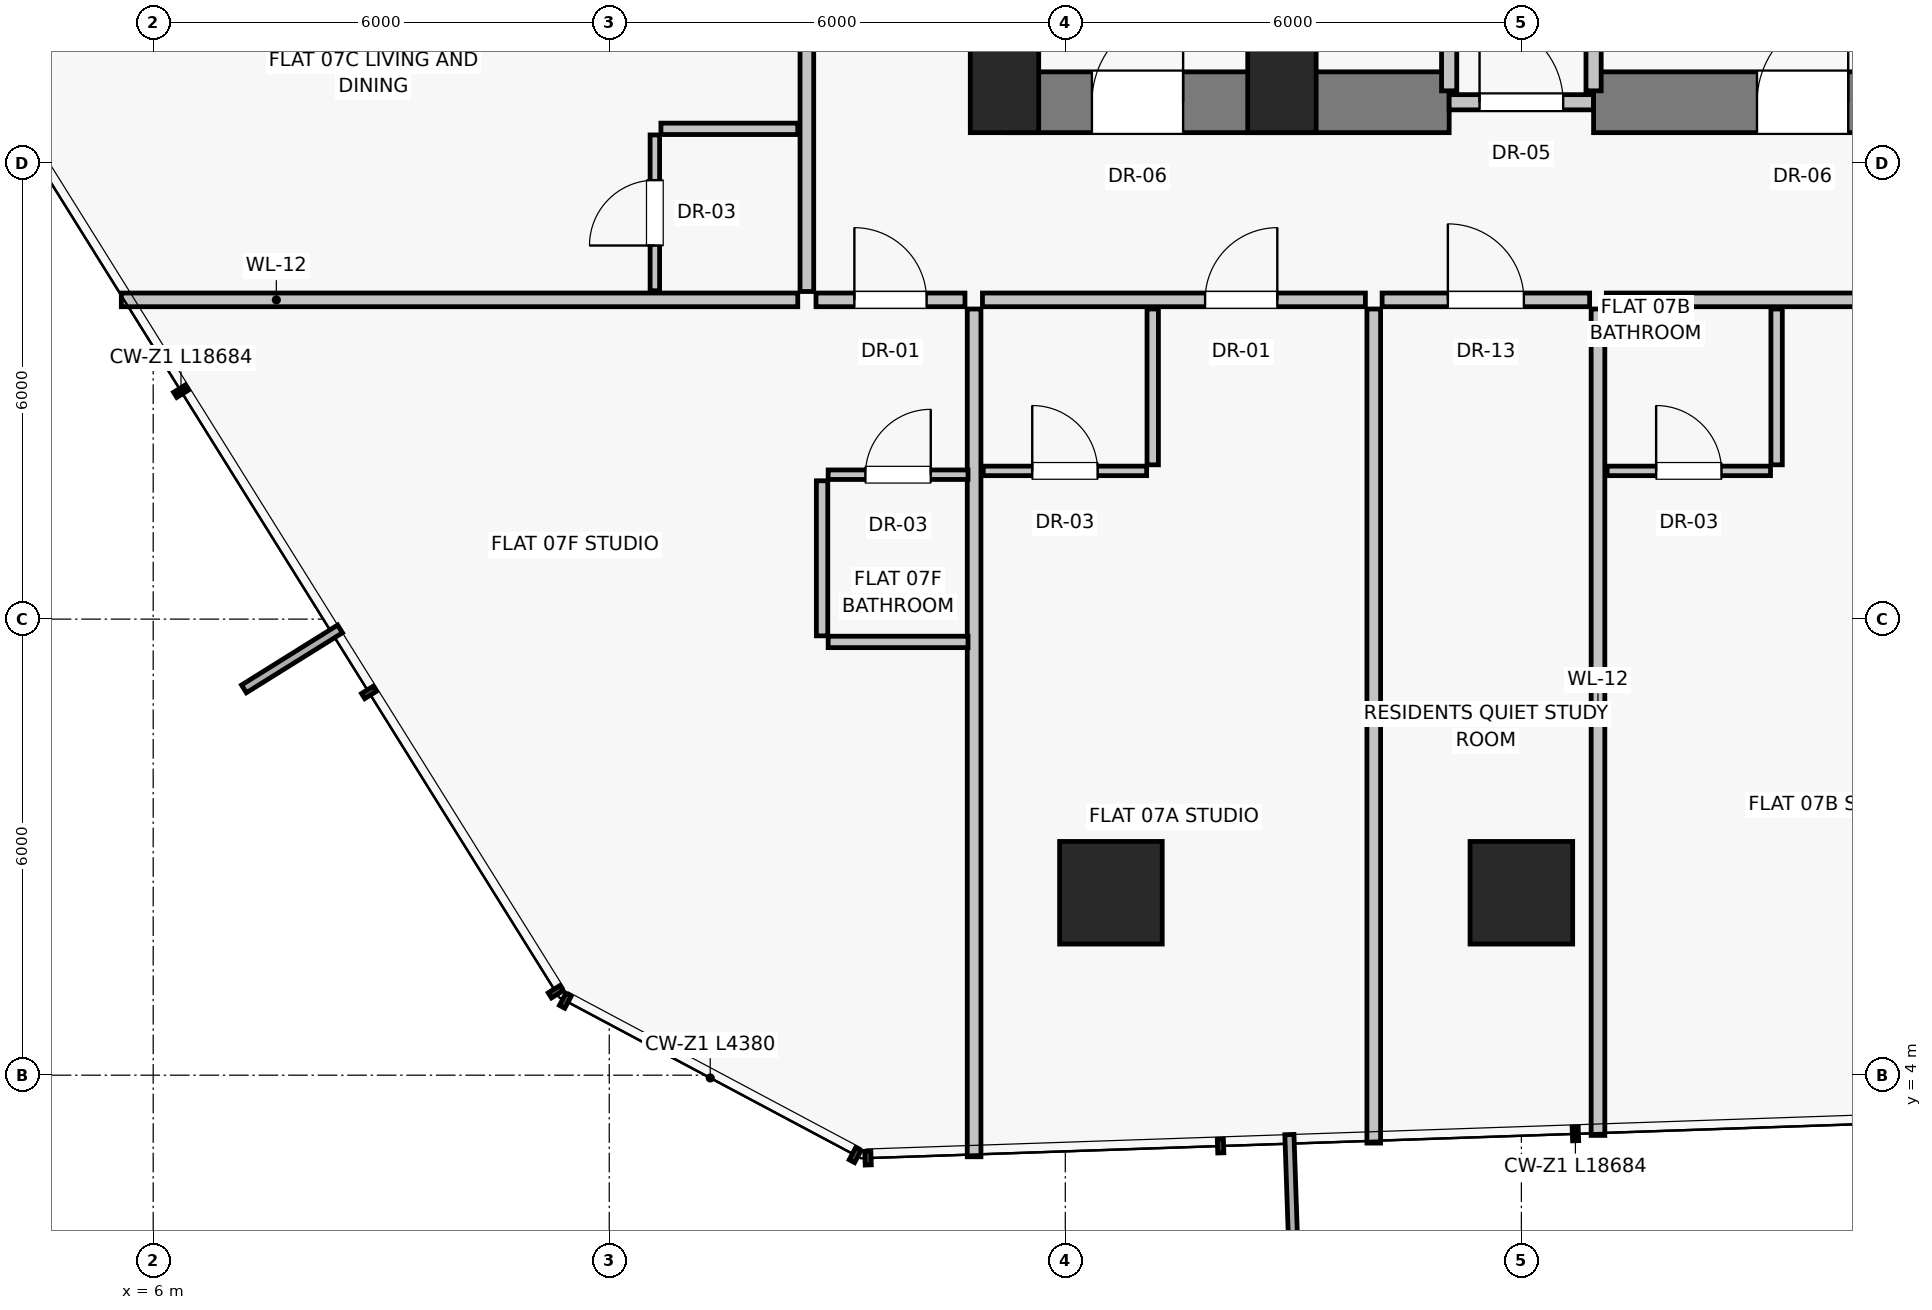
"""IFC4 building model, lengths in metres.
Left out: names, types, materials, properties, quantities, classifications, styles, units other than length and angle.
Written with IfcOpenShell. Run it as: python <this file> out.ifc"""

import sys

from ifc_helpers import new_model, si_unit, direction, frame, frame_2d, origin, origin_2d, place, context, subcontext, project, spatial, rectangle, extrude, source, transform, mapped, element, fill, save


model = new_model("IFC4")
c1 = context("Model", 3, precision=1e-05, world=origin(), true_north=direction((0.0, 1.0)))
c2 = subcontext(c1, "Body", "Model", "MODEL_VIEW")
j1 = project(units=[si_unit("LENGTHUNIT", "METRE"), si_unit("PLANEANGLEUNIT", "RADIAN")], contexts=[c1])
p1 = place(None, origin())
s1 = spatial("IfcSite", under=j1, at=p1, CompositionType="ELEMENT")
p2 = place(p1, origin())
s2 = spatial("IfcBuilding", under=s1, at=p2, CompositionType="ELEMENT")
p3 = place(p2, frame((0.0, 0.0, 30.55)))
s3 = spatial("IfcBuildingStorey", under=s2, at=p3, CompositionType="ELEMENT", Elevation=30.55)
for number, where, z_axis, x_axis in (
    (1, (17.2, 17.0, 0.0), (0.0, 0.0, 1.0), (1.0, 0.0, 0.0)),
    (2, (20.85, 17.0, 0.0), (0.0, 0.0, 1.0), (1.0, 0.0, 0.0)),
):
    element("IfcColumn", number, at=place(p3, frame(where, z_axis=z_axis, x_axis=x_axis)), inside=s3, PredefinedType="PILASTER", context=c2, shape_type="SweptSolid", body=[
        extrude(rectangle(XDim=0.9, YDim=1.2, at=origin_2d()), origin(), (0.0, 0.0, 1.0), 3.25),
    ])
for number, where, z_axis, x_axis in (
    (3, (18.6, 6.4, 0.0), (0.0, 0.0, 1.0), (1.0, 0.0, 0.0)),
    (4, (24.0, 6.4, 0.0), (0.0, 0.0, 1.0), (1.0, 0.0, 0.0)),
):
    element("IfcColumn", number, at=place(p3, frame(where, z_axis=z_axis, x_axis=x_axis)), inside=s3, PredefinedType="COLUMN", context=c2, shape_type="SweptSolid", body=[
        extrude(rectangle(XDim=1.35, YDim=1.35, at=origin_2d()), origin(), (0.0, 0.0, 1.0), 3.25),
    ])
p4 = place(p3, frame((17.2, 16.8, 0.0), z_axis=(0.0, 0.0, 1.0), x_axis=(0.0, 1.0, 0.0)))
e5 = element("IfcWall", 5, at=p4, inside=s3, PredefinedType="SHEAR", context=c2, shape_type="SweptSolid", body=[
    extrude(rectangle(XDim=14.2, YDim=0.8, at=frame_2d((7.1, 0.0))), origin(), (0.0, 0.0, 1.0), 3.0),
])
p5 = place(p3, frame((17.2, 16.8, 0.0), z_axis=(0.0, 0.0, 1.0), x_axis=(1.0, 0.0, 0.0)))
e6 = element("IfcWall", 6, at=p5, inside=s3, PredefinedType="SHEAR", context=c2, shape_type="SweptSolid", body=[
    extrude(rectangle(XDim=5.85, YDim=0.8, at=frame_2d((2.925, 0.0))), origin(), (0.0, 0.0, 1.0), 3.0),
])
p6 = place(p5, frame((1.15, 0.0, 0.0)))
e7 = element("IfcOpeningElement", 7, at=p6, cuts=e6, PredefinedType="OPENING", context=c2, shape_type="SweptSolid", body=[
    extrude(rectangle(XDim=1.2, YDim=2.03, at=frame_2d((0.6, 1.015))), frame((0.0, 0.41, 0.0), z_axis=(0.0, -1.0, 0.0), x_axis=(1.0, 0.0, 0.0)), (0.0, 0.0, 1.0), 0.82),
])
p7 = place(p3, frame((23.05, 16.8, 0.0), z_axis=(0.0, 0.0, 1.0), x_axis=(1.0, 0.0, 0.0)))
e8 = element("IfcWall", 8, at=p7, inside=s3, PredefinedType="SOLIDWALL", context=c2, shape_type="SweptSolid", body=[
    extrude(rectangle(XDim=1.9, YDim=0.2, at=frame_2d((0.95, 0.0))), origin(), (0.0, 0.0, 1.0), 2.15),
])
p8 = place(p7, frame((0.4, 0.0, 0.0)))
e9 = element("IfcOpeningElement", 9, at=p8, cuts=e8, PredefinedType="OPENING", context=c2, shape_type="SweptSolid", body=[
    extrude(rectangle(XDim=1.1, YDim=2.03, at=frame_2d((0.55, 1.015))), frame((0.0, 0.11, 0.0), z_axis=(0.0, -1.0, 0.0), x_axis=(1.0, 0.0, 0.0)), (0.0, 0.0, 1.0), 0.22),
])
p9 = place(p3, frame((24.95, 16.8, 0.0), z_axis=(0.0, 0.0, 1.0), x_axis=(1.0, 0.0, 0.0)))
e10 = element("IfcWall", 10, at=p9, inside=s3, PredefinedType="SHEAR", context=c2, shape_type="SweptSolid", body=[
    extrude(rectangle(XDim=5.85, YDim=0.8, at=frame_2d((2.925, 0.0))), origin(), (0.0, 0.0, 1.0), 3.0),
])
p10 = place(p9, frame((2.15, 0.0, 0.0)))
e11 = element("IfcOpeningElement", 11, at=p10, cuts=e10, PredefinedType="OPENING", context=c2, shape_type="SweptSolid", body=[
    extrude(rectangle(XDim=1.2, YDim=2.03, at=frame_2d((0.6, 1.015))), frame((0.0, 0.41, 0.0), z_axis=(0.0, -1.0, 0.0), x_axis=(1.0, 0.0, 0.0)), (0.0, 0.0, 1.0), 0.82),
])
for number, where, z_axis, x_axis in (
    (12, (23.05, 16.95, 0.0), (0.0, 0.0, 1.0), (0.0, 1.0, 0.0)),
    (13, (24.95, 16.95, 0.0), (0.0, 0.0, 1.0), (0.0, 1.0, 0.0)),
):
    element("IfcWall", number, at=place(p3, frame(where, z_axis=z_axis, x_axis=x_axis)), inside=s3, PredefinedType="SOLIDWALL", context=c2, shape_type="SweptSolid", body=[
        extrude(rectangle(XDim=5.6, YDim=0.2, at=frame_2d((2.8, 0.0))), origin(), (0.0, 0.0, 1.0), 3.0),
    ])
p11 = place(p3, frame((16.8, 14.08, 0.0), z_axis=(0.0, 0.0, 1.0), x_axis=(0.0, -1.0, 0.0)))
e14 = element("IfcWall", 14, at=p11, inside=s3, PredefinedType="PARTITIONING", context=c2, shape_type="SweptSolid", body=[
    extrude(rectangle(XDim=11.153, YDim=0.18, at=frame_2d((5.577, 0.0))), origin(), (0.0, 0.0, 1.0), 3.0),
])
p12 = place(p3, frame((22.168, 14.2, 0.0), z_axis=(0.0, 0.0, 1.0), x_axis=(1.0, 0.0, 0.0)))
e15 = element("IfcWall", 15, at=p12, inside=s3, PredefinedType="PARTITIONING", context=c2, shape_type="SweptSolid", body=[
    extrude(rectangle(XDim=2.73, YDim=0.18, at=frame_2d((1.365, 0.0))), origin(), (0.0, 0.0, 1.0), 3.0),
])
p13 = place(p12, frame((0.865, 0.0, 0.0)))
e16 = element("IfcOpeningElement", 16, at=p13, cuts=e15, PredefinedType="OPENING", context=c2, shape_type="SweptSolid", body=[
    extrude(rectangle(XDim=1.0, YDim=2.01, at=frame_2d((0.5, 1.005))), frame((0.0, 0.1, 0.0), z_axis=(0.0, -1.0, 0.0), x_axis=(1.0, 0.0, 0.0)), (0.0, 0.0, 1.0), 0.2),
])
p14 = place(p3, frame((22.058, 14.08, 0.0), z_axis=(0.0, 0.0, 1.0), x_axis=(0.0, -1.0, 0.0)))
e17 = element("IfcWall", 17, at=p14, inside=s3, PredefinedType="PARTITIONING", context=c2, shape_type="SweptSolid", body=[
    extrude(rectangle(XDim=10.973, YDim=0.18, at=frame_2d((5.487, 0.0))), origin(), (0.0, 0.0, 1.0), 3.0),
])
p15 = place(p3, frame((16.91, 14.2, 0.0), z_axis=(0.0, 0.0, 1.0), x_axis=(1.0, 0.0, 0.0)))
e18 = element("IfcWall", 18, at=p15, inside=s3, PredefinedType="PARTITIONING", context=c2, shape_type="SweptSolid", body=[
    extrude(rectangle(XDim=5.038, YDim=0.18, at=frame_2d((2.519, 0.0))), origin(), (0.0, 0.0, 1.0), 3.0),
])
p16 = place(p15, frame((2.929, 0.0, 0.0)))
e19 = element("IfcOpeningElement", 19, at=p16, cuts=e18, PredefinedType="OPENING", context=c2, shape_type="SweptSolid", body=[
    extrude(rectangle(XDim=0.95, YDim=2.02, at=frame_2d((0.475, 1.01))), frame((0.0, 0.1, 0.0), z_axis=(0.0, -1.0, 0.0), x_axis=(1.0, 0.0, 0.0)), (0.0, 0.0, 1.0), 0.2),
])
p17 = place(p3, frame((19.15, 14.08, 0.0), z_axis=(0.0, 0.0, 1.0), x_axis=(0.0, -1.0, 0.0)))
e20 = element("IfcWall", 20, at=p17, inside=s3, PredefinedType="PARTITIONING", context=c2, shape_type="SweptSolid", body=[
    extrude(rectangle(XDim=2.05, YDim=0.15, at=frame_2d((1.025, 0.0))), origin(), (0.0, 0.0, 1.0), 3.0),
])
p18 = place(p3, frame((16.92, 11.95, 0.0), z_axis=(0.0, 0.0, 1.0), x_axis=(1.0, 0.0, 0.0)))
e21 = element("IfcWall", 21, at=p18, inside=s3, PredefinedType="PARTITIONING", context=c2, shape_type="SweptSolid", body=[
    extrude(rectangle(XDim=2.15, YDim=0.125, at=frame_2d((1.075, 0.0))), origin(), (0.0, 0.0, 1.0), 2.58),
])
p19 = place(p18, frame((0.645, 0.0, 0.0)))
e22 = element("IfcOpeningElement", 22, at=p19, cuts=e21, PredefinedType="OPENING", context=c2, shape_type="SweptSolid", body=[
    extrude(rectangle(XDim=0.86, YDim=2.01, at=frame_2d((0.43, 1.005))), frame((0.0, 0.073, 0.0), z_axis=(0.0, -1.0, 0.0), x_axis=(1.0, 0.0, 0.0)), (0.0, 0.0, 1.0), 0.145),
])
p20 = place(p3, frame((25.008, 14.08, 0.0), z_axis=(0.0, 0.0, 1.0), x_axis=(0.0, -1.0, 0.0)))
e23 = element("IfcWall", 23, at=p20, inside=s3, PredefinedType="PARTITIONING", context=c2, shape_type="SweptSolid", body=[
    extrude(rectangle(XDim=10.872, YDim=0.18, at=frame_2d((5.436, 0.0))), origin(), (0.0, 0.0, 1.0), 3.0),
])
p21 = place(p3, frame((25.118, 14.2, 0.0), z_axis=(0.0, 0.0, 1.0), x_axis=(1.0, 0.0, 0.0)))
e24 = element("IfcWall", 24, at=p21, inside=s3, PredefinedType="PARTITIONING", context=c2, shape_type="SweptSolid", body=[
    extrude(rectangle(XDim=5.972, YDim=0.18, at=frame_2d((2.986, 0.0))), origin(), (0.0, 0.0, 1.0), 3.0),
])
p22 = place(p21, frame((3.62, 0.0, 0.0)))
e25 = element("IfcOpeningElement", 25, at=p22, cuts=e24, PredefinedType="OPENING", context=c2, shape_type="SweptSolid", body=[
    extrude(rectangle(XDim=0.95, YDim=2.02, at=frame_2d((0.475, 1.01))), frame((0.0, 0.1, 0.0), z_axis=(0.0, -1.0, 0.0), x_axis=(1.0, 0.0, 0.0)), (0.0, 0.0, 1.0), 0.2),
])
p23 = place(p3, frame((27.358, 14.08, 0.0), z_axis=(0.0, 0.0, 1.0), x_axis=(0.0, -1.0, 0.0)))
e26 = element("IfcWall", 26, at=p23, inside=s3, PredefinedType="PARTITIONING", context=c2, shape_type="SweptSolid", body=[
    extrude(rectangle(XDim=2.05, YDim=0.15, at=frame_2d((1.025, 0.0))), origin(), (0.0, 0.0, 1.0), 3.0),
])
p24 = place(p3, frame((25.128, 11.95, 0.0), z_axis=(0.0, 0.0, 1.0), x_axis=(1.0, 0.0, 0.0)))
e27 = element("IfcWall", 27, at=p24, inside=s3, PredefinedType="PARTITIONING", context=c2, shape_type="SweptSolid", body=[
    extrude(rectangle(XDim=2.15, YDim=0.125, at=frame_2d((1.075, 0.0))), origin(), (0.0, 0.0, 1.0), 2.58),
])
p25 = place(p24, frame((0.645, 0.0, 0.0)))
e28 = element("IfcOpeningElement", 28, at=p25, cuts=e27, PredefinedType="OPENING", context=c2, shape_type="SweptSolid", body=[
    extrude(rectangle(XDim=0.86, YDim=2.01, at=frame_2d((0.43, 1.005))), frame((0.0, 0.073, 0.0), z_axis=(0.0, -1.0, 0.0), x_axis=(1.0, 0.0, 0.0)), (0.0, 0.0, 1.0), 0.145),
])
p26 = place(p3, frame((14.48, 14.2, 0.0), z_axis=(0.0, 0.0, 1.0), x_axis=(-1.0, 0.0, 0.0)))
e29 = element("IfcWall", 29, at=p26, inside=s3, PredefinedType="PARTITIONING", context=c2, shape_type="SweptSolid", body=[
    extrude(rectangle(XDim=8.899, YDim=0.18, at=frame_2d((4.45, 0.0))), origin(), (0.0, 0.0, 1.0), 3.0),
])
p27 = place(p3, frame((14.6, 14.31, 0.0), z_axis=(0.0, 0.0, 1.0), x_axis=(0.0, 1.0, 0.0)))
e30 = element("IfcWall", 30, at=p27, inside=s3, PredefinedType="PARTITIONING", context=c2, shape_type="SweptSolid", body=[
    extrude(rectangle(XDim=11.808, YDim=0.18, at=frame_2d((5.904, 0.0))), origin(), (0.0, 0.0, 1.0), 3.0),
])
p28 = place(p27, frame((3.847, 0.0, 0.0)))
e31 = element("IfcOpeningElement", 31, at=p28, cuts=e30, PredefinedType="OPENING", context=c2, shape_type="SweptSolid", body=[
    extrude(rectangle(XDim=0.95, YDim=2.02, at=frame_2d((0.475, 1.01))), frame((0.0, 0.1, 0.0), z_axis=(0.0, -1.0, 0.0), x_axis=(1.0, 0.0, 0.0)), (0.0, 0.0, 1.0), 0.2),
])
p29 = place(p3, frame((14.48, 16.45, 0.0), z_axis=(0.0, 0.0, 1.0), x_axis=(-1.0, 0.0, 0.0)))
e32 = element("IfcWall", 32, at=p29, inside=s3, PredefinedType="PARTITIONING", context=c2, shape_type="SweptSolid", body=[
    extrude(rectangle(XDim=1.8, YDim=0.15, at=frame_2d((0.9, 0.0))), origin(), (0.0, 0.0, 1.0), 3.0),
])
p30 = place(p3, frame((12.6, 14.32, 0.0), z_axis=(0.0, 0.0, 1.0), x_axis=(0.0, 1.0, 0.0)))
e33 = element("IfcWall", 33, at=p30, inside=s3, PredefinedType="PARTITIONING", context=c2, shape_type="SweptSolid", body=[
    extrude(rectangle(XDim=2.05, YDim=0.125, at=frame_2d((1.025, 0.0))), origin(), (0.0, 0.0, 1.0), 3.0),
])
p31 = place(p30, frame((0.595, 0.0, 0.0)))
e34 = element("IfcOpeningElement", 34, at=p31, cuts=e33, PredefinedType="OPENING", context=c2, shape_type="SweptSolid", body=[
    extrude(rectangle(XDim=0.86, YDim=2.01, at=frame_2d((0.43, 1.005))), frame((0.0, 0.073, 0.0), z_axis=(0.0, -1.0, 0.0), x_axis=(1.0, 0.0, 0.0)), (0.0, 0.0, 1.0), 0.145),
])
p32 = place(p3, frame((14.72, 14.2, 0.0), z_axis=(0.0, 0.0, 1.0), x_axis=(1.0, 0.0, 0.0)))
e35 = element("IfcWall", 35, at=p32, inside=s3, PredefinedType="PARTITIONING", context=c2, shape_type="SweptSolid", body=[
    extrude(rectangle(XDim=1.96, YDim=0.18, at=frame_2d((0.98, 0.0))), origin(), (0.0, 0.0, 1.0), 3.0),
])
p33 = place(p32, frame((0.505, 0.0, 0.0)))
e36 = element("IfcOpeningElement", 36, at=p33, cuts=e35, PredefinedType="OPENING", context=c2, shape_type="SweptSolid", body=[
    extrude(rectangle(XDim=0.95, YDim=2.02, at=frame_2d((0.475, 1.01))), frame((0.0, 0.1, 0.0), z_axis=(0.0, -1.0, 0.0), x_axis=(1.0, 0.0, 0.0)), (0.0, 0.0, 1.0), 0.2),
])
p34 = place(p3, frame((14.88, 11.9, 0.0), z_axis=(0.0, 0.0, 1.0), x_axis=(1.0, 0.0, 0.0)))
e37 = element("IfcWall", 37, at=p34, inside=s3, PredefinedType="PARTITIONING", context=c2, shape_type="SweptSolid", body=[
    extrude(rectangle(XDim=1.84, YDim=0.125, at=frame_2d((0.92, 0.0))), origin(), (0.0, 0.0, 1.0), 3.0),
])
p35 = place(p34, frame((0.49, 0.0, 0.0)))
e38 = element("IfcOpeningElement", 38, at=p35, cuts=e37, PredefinedType="OPENING", context=c2, shape_type="SweptSolid", body=[
    extrude(rectangle(XDim=0.86, YDim=2.01, at=frame_2d((0.43, 1.005))), frame((0.0, 0.073, 0.0), z_axis=(0.0, -1.0, 0.0), x_axis=(1.0, 0.0, 0.0)), (0.0, 0.0, 1.0), 0.145),
])
p36 = place(p3, frame((14.88, 9.7, 0.0), z_axis=(0.0, 0.0, 1.0), x_axis=(1.0, 0.0, 0.0)))
e39 = element("IfcWall", 39, at=p36, inside=s3, PredefinedType="PARTITIONING", context=c2, shape_type="SweptSolid", body=[
    extrude(rectangle(XDim=1.84, YDim=0.15, at=frame_2d((0.92, 0.0))), origin(), (0.0, 0.0, 1.0), 3.0),
])
p37 = place(p3, frame((14.8, 9.78, 0.0), z_axis=(0.0, 0.0, 1.0), x_axis=(0.0, 1.0, 0.0)))
e40 = element("IfcWall", 40, at=p37, inside=s3, PredefinedType="PARTITIONING", context=c2, shape_type="SweptSolid", body=[
    extrude(rectangle(XDim=2.04, YDim=0.15, at=frame_2d((1.02, 0.0))), origin(), (0.0, 0.0, 1.0), 3.0),
])
m1 = source(origin(), c2, "Body", "SweptSolid", [
    extrude(rectangle(XDim=1.2, YDim=2.03, at=frame_2d((0.6, 1.015))), frame((0.0, 0.025, 0.0), z_axis=(0.0, -1.0, 0.0), x_axis=(1.0, 0.0, 0.0)), (0.0, 0.0, 1.0), 0.05),
])
p38 = place(p6, origin())
e41 = element("IfcDoor", 41, at=p38, inside=s3, OperationType="SINGLE_SWING_RIGHT", PredefinedType="DOOR", context=c2, shape_type="MappedRepresentation", body=[
    mapped(m1, transform((0.0, 0.0, 0.0), scale=1.0)),
])
fill(e7, e41)
m2 = source(origin(), c2, "Body", "SweptSolid", [
    extrude(rectangle(XDim=1.1, YDim=2.03, at=frame_2d((0.55, 1.015))), frame((0.0, 0.025, 0.0), z_axis=(0.0, -1.0, 0.0), x_axis=(1.0, 0.0, 0.0)), (0.0, 0.0, 1.0), 0.05),
])
p39 = place(p8, origin())
e42 = element("IfcDoor", 42, at=p39, inside=s3, OperationType="SINGLE_SWING_LEFT", PredefinedType="DOOR", context=c2, shape_type="MappedRepresentation", body=[
    mapped(m2, transform((0.0, 0.0, 0.0), scale=1.0)),
])
fill(e9, e42)
p40 = place(p10, origin())
e43 = element("IfcDoor", 43, at=p40, inside=s3, OperationType="SINGLE_SWING_RIGHT", PredefinedType="DOOR", context=c2, shape_type="MappedRepresentation", body=[
    mapped(m1, transform((0.0, 0.0, 0.0), scale=1.0)),
])
fill(e11, e43)
m3 = source(origin(), c2, "Body", "SweptSolid", [
    extrude(rectangle(XDim=1.0, YDim=2.01, at=frame_2d((0.5, 1.005))), frame((0.0, 0.025, 0.0), z_axis=(0.0, -1.0, 0.0), x_axis=(1.0, 0.0, 0.0)), (0.0, 0.0, 1.0), 0.05),
])
p41 = place(p13, origin())
e44 = element("IfcDoor", 44, at=p41, inside=s3, OperationType="SINGLE_SWING_LEFT", PredefinedType="DOOR", context=c2, shape_type="MappedRepresentation", body=[
    mapped(m3, transform((0.0, 0.0, 0.0), scale=1.0)),
])
fill(e16, e44)
m4 = source(origin(), c2, "Body", "SweptSolid", [
    extrude(rectangle(XDim=0.95, YDim=2.02, at=frame_2d((0.475, 1.01))), frame((0.0, 0.025, 0.0), z_axis=(0.0, -1.0, 0.0), x_axis=(1.0, 0.0, 0.0)), (0.0, 0.0, 1.0), 0.05),
])
p42 = place(p16, origin())
e45 = element("IfcDoor", 45, at=p42, inside=s3, OperationType="SINGLE_SWING_RIGHT", PredefinedType="DOOR", context=c2, shape_type="MappedRepresentation", body=[
    mapped(m4, transform((0.0, 0.0, 0.0), scale=1.0)),
])
fill(e19, e45)
m5 = source(origin(), c2, "Body", "SweptSolid", [
    extrude(rectangle(XDim=0.86, YDim=2.01, at=frame_2d((0.43, 1.005))), frame((0.0, 0.025, 0.0), z_axis=(0.0, -1.0, 0.0), x_axis=(1.0, 0.0, 0.0)), (0.0, 0.0, 1.0), 0.05),
])
p43 = place(p19, origin())
e46 = element("IfcDoor", 46, at=p43, inside=s3, OperationType="SINGLE_SWING_LEFT", PredefinedType="DOOR", context=c2, shape_type="MappedRepresentation", body=[
    mapped(m5, transform((0.0, 0.0, 0.0), scale=1.0)),
])
fill(e22, e46)
p44 = place(p25, origin())
e47 = element("IfcDoor", 47, at=p44, inside=s3, OperationType="SINGLE_SWING_LEFT", PredefinedType="DOOR", context=c2, shape_type="MappedRepresentation", body=[
    mapped(m5, transform((0.0, 0.0, 0.0), scale=1.0)),
])
fill(e28, e47)
p45 = place(p31, origin())
e48 = element("IfcDoor", 48, at=p45, inside=s3, OperationType="SINGLE_SWING_LEFT", PredefinedType="DOOR", context=c2, shape_type="MappedRepresentation", body=[
    mapped(m5, transform((0.0, 0.0, 0.0), scale=1.0)),
])
fill(e34, e48)
p46 = place(p33, origin())
e49 = element("IfcDoor", 49, at=p46, inside=s3, OperationType="SINGLE_SWING_LEFT", PredefinedType="DOOR", context=c2, shape_type="MappedRepresentation", body=[
    mapped(m4, transform((0.0, 0.0, 0.0), scale=1.0)),
])
fill(e36, e49)
p47 = place(p35, origin())
e50 = element("IfcDoor", 50, at=p47, inside=s3, OperationType="SINGLE_SWING_RIGHT", PredefinedType="DOOR", context=c2, shape_type="MappedRepresentation", body=[
    mapped(m5, transform((0.0, 0.0, 0.0), scale=1.0)),
])
fill(e38, e50)
save(model, sys.argv[1])
